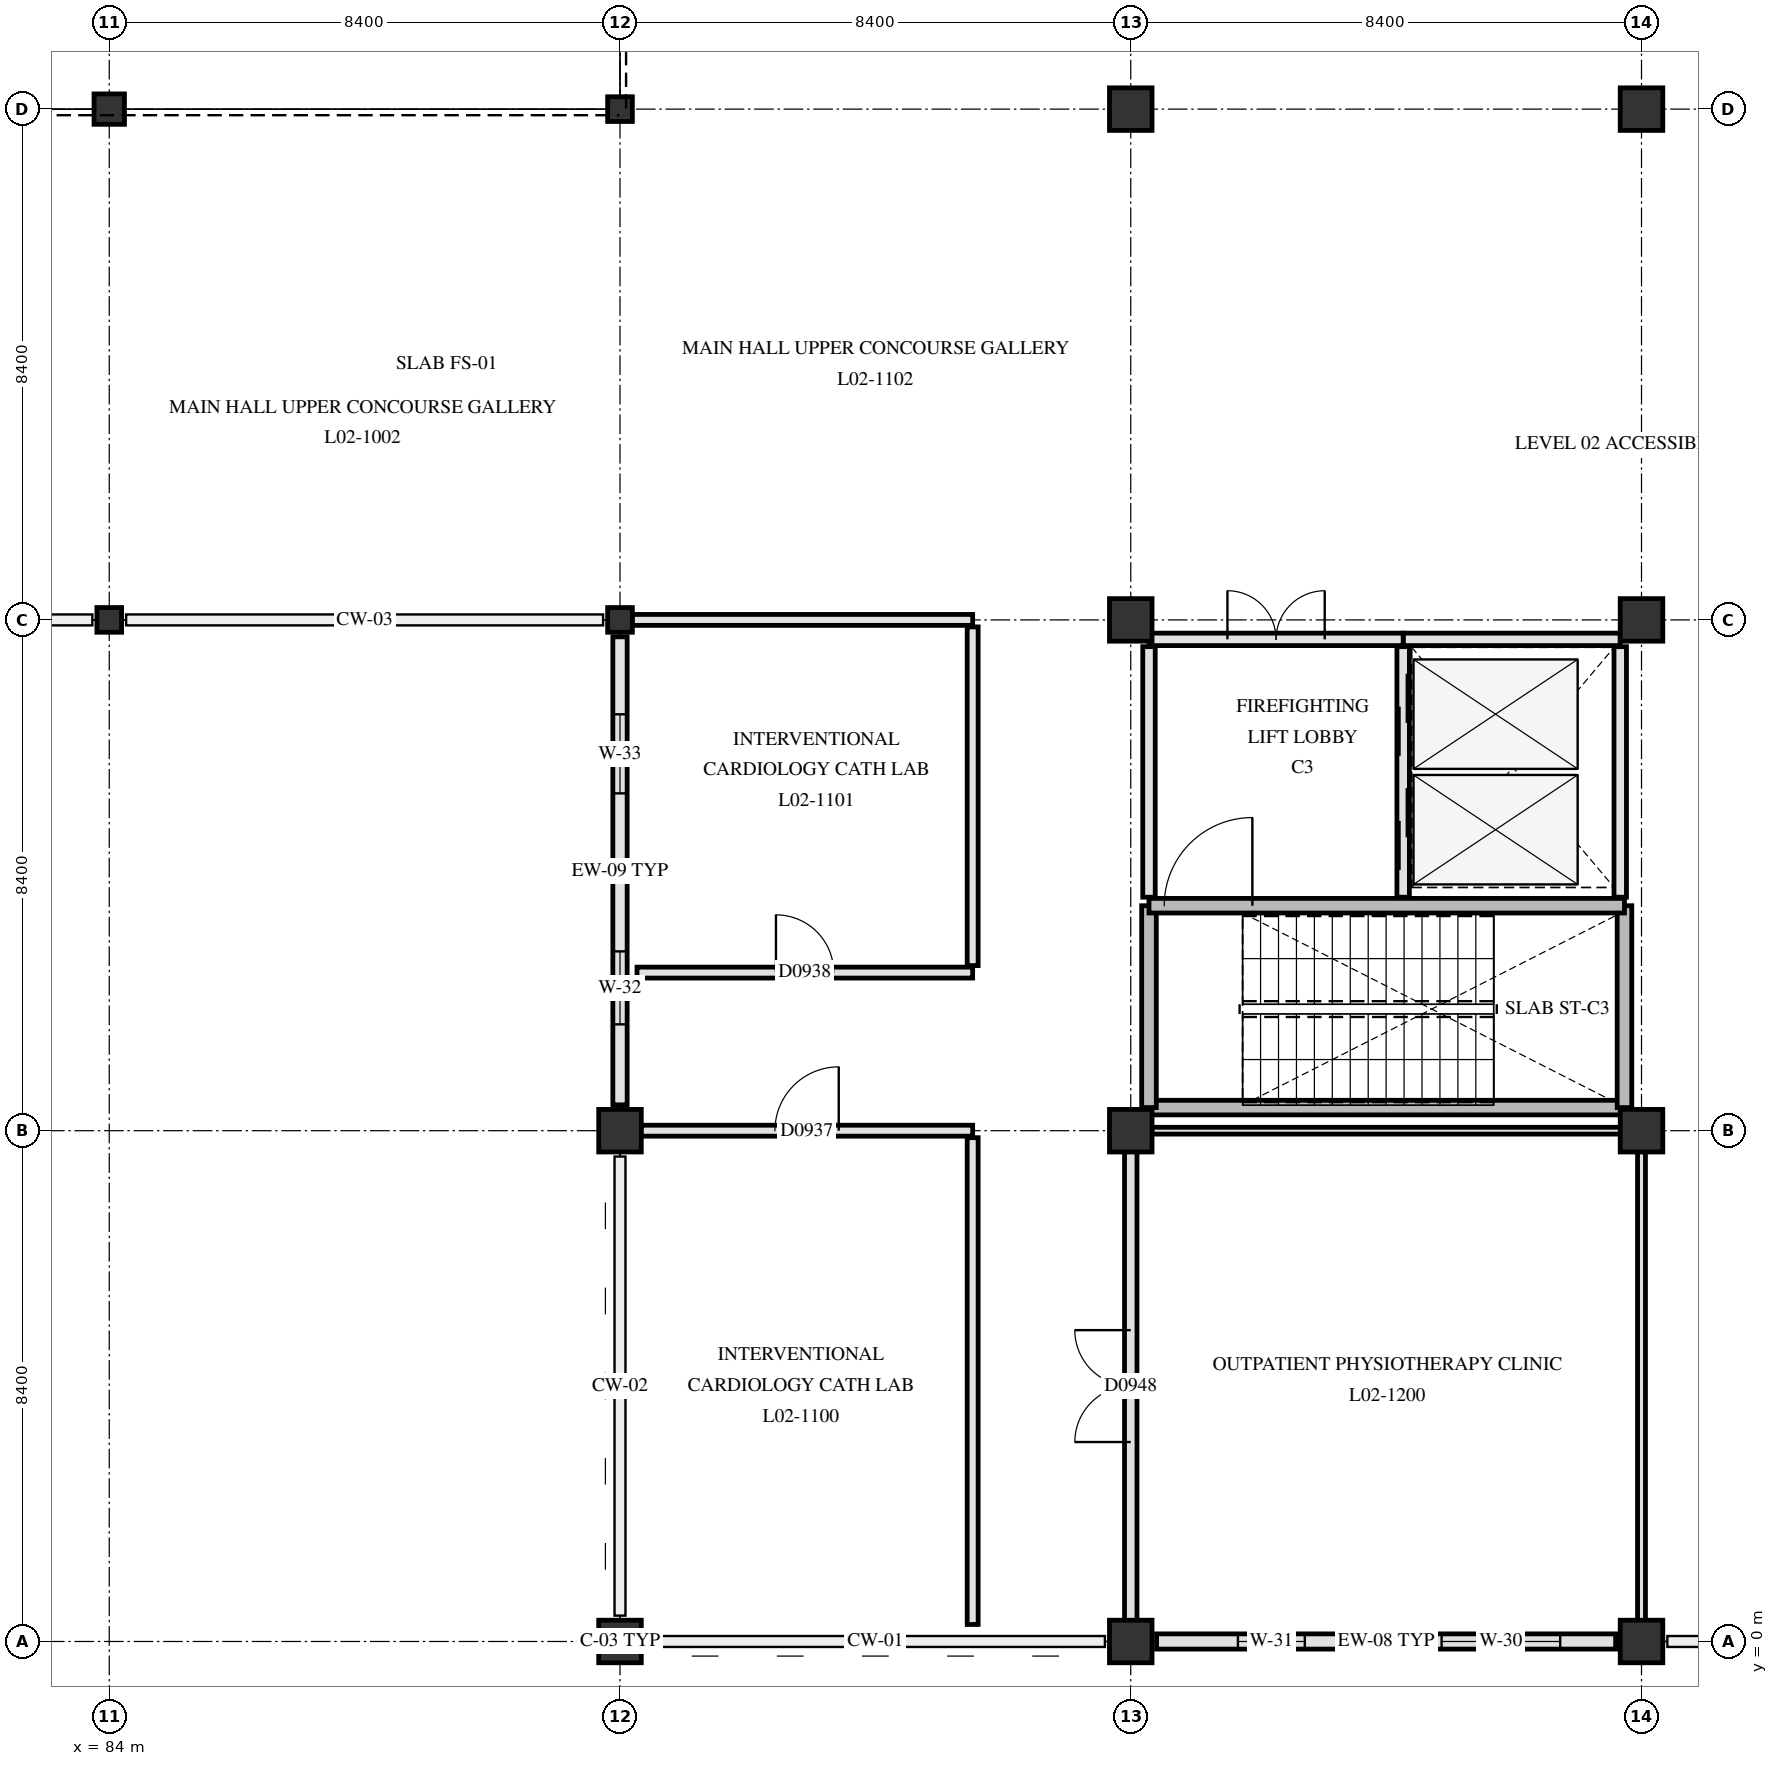
"""IFC4 building model, lengths in metres.
Left out: names, types, materials, properties, quantities, classifications, styles, units other than length and angle.
Written with IfcOpenShell. Run it as: python <this file> out.ifc"""

import sys

from ifc_helpers import new_model, si_unit, direction, frame, frame_2d, origin, origin_2d, place, context, subcontext, project, spatial, rectangle, hollow_circle, extrude, element, fill, save


model = new_model("IFC4")
c1 = context("Model", 3, precision=1e-05, world=origin(), true_north=direction((0.0, 1.0)))
c2 = subcontext(c1, "Body", "Model", "MODEL_VIEW")
j1 = project(units=[si_unit("LENGTHUNIT", "METRE"), si_unit("PLANEANGLEUNIT", "RADIAN")], contexts=[c1])
p1 = place(None, origin())
s1 = spatial("IfcSite", under=j1, at=p1, CompositionType="ELEMENT")
p2 = place(p1, origin())
s2 = spatial("IfcBuilding", under=s1, at=p2, CompositionType="ELEMENT")
p3 = place(p2, frame((0.0, 0.0, 9.3)))
s3 = spatial("IfcBuildingStorey", under=s2, at=p3, CompositionType="ELEMENT", Elevation=9.3)
p4 = place(p3, frame((84.0, 16.8, 0.0), z_axis=(0.0, 0.0, 1.0), x_axis=(1.0, 0.0, 0.0)))
e1 = element("IfcColumn", 1, at=p4, inside=s3, PredefinedType="COLUMN", context=c2, shape_type="SweptSolid", body=[
    extrude(hollow_circle(Radius=0.203, WallThickness=0.016, at=origin_2d()), origin(), (0.0, 0.0, 1.0), 5.1),
])
p5 = place(p3, frame((84.0, 25.2, 0.0), z_axis=(0.0, 0.0, 1.0), x_axis=(1.0, 0.0, 0.0)))
e2 = element("IfcColumn", 2, at=p5, inside=s3, PredefinedType="COLUMN", context=c2, shape_type="SweptSolid", body=[
    extrude(rectangle(XDim=0.5, YDim=0.5, at=origin_2d()), origin(), (0.0, 0.0, 1.0), 5.1),
])
for number, where, z_axis, x_axis in (
    (3, (92.4, 0.0, 0.0), (0.0, 0.0, 1.0), (1.0, 0.0, 0.0)),
    (4, (92.4, 8.4, 0.0), (0.0, 0.0, 1.0), (1.0, 0.0, 0.0)),
):
    element("IfcColumn", number, at=place(p3, frame(where, z_axis=z_axis, x_axis=x_axis)), inside=s3, PredefinedType="COLUMN", context=c2, shape_type="SweptSolid", body=[
        extrude(rectangle(XDim=0.7, YDim=0.7, at=origin_2d()), origin(), (0.0, 0.0, 1.0), 5.1),
    ])
for number, where, z_axis, x_axis in (
    (5, (92.4, 16.8, 0.0), (0.0, 0.0, 1.0), (1.0, 0.0, 0.0)),
    (6, (92.4, 25.2, 0.0), (0.0, 0.0, 1.0), (1.0, 0.0, 0.0)),
):
    element("IfcColumn", number, at=place(p3, frame(where, z_axis=z_axis, x_axis=x_axis)), inside=s3, PredefinedType="COLUMN", context=c2, shape_type="SweptSolid", body=[
        extrude(hollow_circle(Radius=0.203, WallThickness=0.016, at=origin_2d()), origin(), (0.0, 0.0, 1.0), 5.1),
    ])
for number, where, z_axis, x_axis in (
    (7, (100.8, 0.0, 0.0), (0.0, 0.0, 1.0), (1.0, 0.0, 0.0)),
    (8, (100.8, 8.4, 0.0), (0.0, 0.0, 1.0), (1.0, 0.0, 0.0)),
    (9, (100.8, 16.8, 0.0), (0.0, 0.0, 1.0), (1.0, 0.0, 0.0)),
    (10, (100.8, 25.2, 0.0), (0.0, 0.0, 1.0), (1.0, 0.0, 0.0)),
    (11, (109.2, 0.0, 0.0), (0.0, 0.0, 1.0), (1.0, 0.0, 0.0)),
    (12, (109.2, 8.4, 0.0), (0.0, 0.0, 1.0), (1.0, 0.0, 0.0)),
    (13, (109.2, 16.8, 0.0), (0.0, 0.0, 1.0), (1.0, 0.0, 0.0)),
    (14, (109.2, 25.2, 0.0), (0.0, 0.0, 1.0), (1.0, 0.0, 0.0)),
):
    element("IfcColumn", number, at=place(p3, frame(where, z_axis=z_axis, x_axis=x_axis)), inside=s3, PredefinedType="COLUMN", context=c2, shape_type="SweptSolid", body=[
        extrude(rectangle(XDim=0.7, YDim=0.7, at=origin_2d()), origin(), (0.0, 0.0, 1.0), 5.1),
    ])
p6 = place(p3, frame((108.775, 0.0, 0.0), z_axis=(0.0, 0.0, 1.0), x_axis=(-1.0, 0.0, 0.0)))
e15 = element("IfcWall", 15, at=p6, inside=s3, PredefinedType="SOLIDWALL", context=c2, shape_type="SweptSolid", body=[
    extrude(rectangle(XDim=7.55, YDim=0.25, at=frame_2d((3.775, 0.0))), origin(), (0.0, 0.0, 1.0), 4.07),
])
p7 = place(p6, frame((0.913, 0.0, 0.85)))
e16 = element("IfcOpeningElement", 16, at=p7, cuts=e15, PredefinedType="OPENING", context=c2, shape_type="SweptSolid", body=[
    extrude(rectangle(XDim=1.95, YDim=1.54, at=frame_2d((0.975, 0.77))), frame((0.0, 0.135, 0.0), z_axis=(0.0, -1.0, 0.0), x_axis=(1.0, 0.0, 0.0)), (0.0, 0.0, 1.0), 0.27),
])
p8 = place(p6, frame((5.113, 0.0, 0.85)))
e17 = element("IfcOpeningElement", 17, at=p8, cuts=e15, PredefinedType="OPENING", context=c2, shape_type="SweptSolid", body=[
    extrude(rectangle(XDim=1.1, YDim=1.66, at=frame_2d((0.55, 0.83))), frame((0.0, 0.135, 0.0), z_axis=(0.0, -1.0, 0.0), x_axis=(1.0, 0.0, 0.0)), (0.0, 0.0, 1.0), 0.27),
])
p9 = place(p3, frame((92.4, 8.825, 0.0), z_axis=(0.0, 0.0, 1.0), x_axis=(0.0, 1.0, 0.0)))
e18 = element("IfcWall", 18, at=p9, inside=s3, PredefinedType="SOLIDWALL", context=c2, shape_type="SweptSolid", body=[
    extrude(rectangle(XDim=7.697, YDim=0.235, at=frame_2d((3.849, 0.0))), origin(), (0.0, 0.0, 1.0), 4.07),
])
p10 = place(p9, frame((1.324, 0.0, 0.85)))
e19 = element("IfcOpeningElement", 19, at=p10, cuts=e18, PredefinedType="OPENING", context=c2, shape_type="SweptSolid", body=[
    extrude(rectangle(XDim=1.2, YDim=1.66, at=frame_2d((0.6, 0.83))), frame((0.0, 0.127, 0.0), z_axis=(0.0, -1.0, 0.0), x_axis=(1.0, 0.0, 0.0)), (0.0, 0.0, 1.0), 0.255),
])
p11 = place(p9, frame((5.123, 0.0, 0.85)))
e20 = element("IfcOpeningElement", 20, at=p11, cuts=e18, PredefinedType="OPENING", context=c2, shape_type="SweptSolid", body=[
    extrude(rectangle(XDim=1.3, YDim=1.66, at=frame_2d((0.65, 0.83))), frame((0.0, 0.127, 0.0), z_axis=(0.0, -1.0, 0.0), x_axis=(1.0, 0.0, 0.0)), (0.0, 0.0, 1.0), 0.255),
])
p12 = place(p3, frame((101.1, 8.78, 0.0), z_axis=(0.0, 0.0, 1.0), x_axis=(1.0, 0.0, 0.0)))
e21 = element("IfcWall", 21, at=p12, inside=s3, PredefinedType="SHEAR", context=c2, shape_type="SweptSolid", body=[
    extrude(rectangle(XDim=7.82, YDim=0.24, at=frame_2d((3.91, 0.0))), origin(), (0.0, 0.0, 1.0), 4.78),
])
for number, where, z_axis, x_axis in (
    (22, (101.1, 8.78, 0.0), (0.0, 0.0, 1.0), (0.0, 1.0, 0.0)),
    (23, (108.92, 8.78, 0.0), (0.0, 0.0, 1.0), (0.0, 1.0, 0.0)),
):
    element("IfcWall", number, at=place(p3, frame(where, z_axis=z_axis, x_axis=x_axis)), inside=s3, PredefinedType="SHEAR", context=c2, shape_type="SweptSolid", body=[
        extrude(rectangle(XDim=3.32, YDim=0.24, at=frame_2d((1.66, 0.0))), origin(), (0.0, 0.0, 1.0), 4.78),
    ])
p13 = place(p3, frame((101.1, 12.1, 0.0), z_axis=(0.0, 0.0, 1.0), x_axis=(1.0, 0.0, 0.0)))
e24 = element("IfcWall", 24, at=p13, inside=s3, PredefinedType="SHEAR", context=c2, shape_type="SweptSolid", body=[
    extrude(rectangle(XDim=7.82, YDim=0.24, at=frame_2d((3.91, 0.0))), origin(), (0.0, 0.0, 1.0), 4.78),
])
p14 = place(p13, frame((0.25, 0.0, 0.0)))
e25 = element("IfcOpeningElement", 25, at=p14, cuts=e24, PredefinedType="OPENING", context=c2, shape_type="SweptSolid", body=[
    extrude(rectangle(XDim=1.45, YDim=2.2, at=frame_2d((0.725, 1.1))), frame((0.0, 0.13, 0.0), z_axis=(0.0, -1.0, 0.0), x_axis=(1.0, 0.0, 0.0)), (0.0, 0.0, 1.0), 0.26),
])
p15 = place(p3, frame((105.28, 12.24, 0.0), z_axis=(0.0, 0.0, 1.0), x_axis=(0.0, 1.0, 0.0)))
e26 = element("IfcWall", 26, at=p15, inside=s3, PredefinedType="PARTITIONING", context=c2, shape_type="SweptSolid", body=[
    extrude(rectangle(XDim=4.12, YDim=0.205, at=frame_2d((2.06, 0.0))), origin(), (0.0, 0.0, 1.0), 4.77),
])
p16 = place(p15, frame((0.445, 0.0, 0.0)))
e27 = element("IfcOpeningElement", 27, at=p16, cuts=e26, PredefinedType="OPENING", context=c2, shape_type="SweptSolid", body=[
    extrude(rectangle(XDim=1.35, YDim=2.2, at=frame_2d((0.675, 1.1))), frame((0.0, 0.113, 0.0), z_axis=(0.0, -1.0, 0.0), x_axis=(1.0, 0.0, 0.0)), (0.0, 0.0, 1.0), 0.225),
])
p17 = place(p15, frame((2.325, 0.0, 0.0)))
e28 = element("IfcOpeningElement", 28, at=p17, cuts=e26, PredefinedType="OPENING", context=c2, shape_type="SweptSolid", body=[
    extrude(rectangle(XDim=1.35, YDim=2.2, at=frame_2d((0.675, 1.1))), frame((0.0, 0.113, 0.0), z_axis=(0.0, -1.0, 0.0), x_axis=(1.0, 0.0, 0.0)), (0.0, 0.0, 1.0), 0.225),
])
p18 = place(p3, frame((108.85, 12.24, 0.0), z_axis=(0.0, 0.0, 1.0), x_axis=(0.0, 1.0, 0.0)))
e29 = element("IfcWall", 29, at=p18, inside=s3, PredefinedType="PARTITIONING", context=c2, shape_type="SweptSolid", body=[
    extrude(rectangle(XDim=4.12, YDim=0.205, at=frame_2d((2.06, 0.0))), origin(), (0.0, 0.0, 1.0), 4.77),
])
p19 = place(p3, frame((105.28, 16.48, 0.0), z_axis=(0.0, 0.0, 1.0), x_axis=(1.0, 0.0, 0.0)))
e30 = element("IfcWall", 30, at=p19, inside=s3, PredefinedType="PARTITIONING", context=c2, shape_type="SweptSolid", body=[
    extrude(rectangle(XDim=3.57, YDim=0.205, at=frame_2d((1.785, 0.0))), origin(), (0.0, 0.0, 1.0), 4.17),
])
p20 = place(p3, frame((101.1, 12.24, 0.0), z_axis=(0.0, 0.0, 1.0), x_axis=(0.0, 1.0, 0.0)))
e31 = element("IfcWall", 31, at=p20, inside=s3, PredefinedType="PARTITIONING", context=c2, shape_type="SweptSolid", body=[
    extrude(rectangle(XDim=4.12, YDim=0.205, at=frame_2d((2.06, 0.0))), origin(), (0.0, 0.0, 1.0), 4.17),
])
p21 = place(p3, frame((101.1, 16.48, 0.0), z_axis=(0.0, 0.0, 1.0), x_axis=(1.0, 0.0, 0.0)))
e32 = element("IfcWall", 32, at=p21, inside=s3, PredefinedType="PARTITIONING", context=c2, shape_type="SweptSolid", body=[
    extrude(rectangle(XDim=4.18, YDim=0.205, at=frame_2d((2.09, 0.0))), origin(), (0.0, 0.0, 1.0), 4.17),
])
p22 = place(p21, frame((1.29, 0.0, 0.0)))
e33 = element("IfcOpeningElement", 33, at=p22, cuts=e32, PredefinedType="OPENING", context=c2, shape_type="SweptSolid", body=[
    extrude(rectangle(XDim=1.6, YDim=2.25, at=frame_2d((0.8, 1.125))), frame((0.0, 0.113, 0.0), z_axis=(0.0, -1.0, 0.0), x_axis=(1.0, 0.0, 0.0)), (0.0, 0.0, 1.0), 0.225),
])
p23 = place(p3, frame((92.745, 8.4, 0.0), z_axis=(0.0, 0.0, 1.0), x_axis=(1.0, 0.0, 0.0)))
e34 = element("IfcWall", 34, at=p23, inside=s3, PredefinedType="PARTITIONING", context=c2, shape_type="SweptSolid", body=[
    extrude(rectangle(XDim=5.455, YDim=0.18, at=frame_2d((2.728, 0.0))), origin(), (0.0, 0.0, 1.0), 4.17),
])
p24 = place(p23, frame((2.202, 0.0, 0.0)))
e35 = element("IfcOpeningElement", 35, at=p24, cuts=e34, PredefinedType="OPENING", context=c2, shape_type="SweptSolid", body=[
    extrude(rectangle(XDim=1.05, YDim=2.15, at=frame_2d((0.525, 1.075))), frame((0.0, 0.1, 0.0), z_axis=(0.0, -1.0, 0.0), x_axis=(1.0, 0.0, 0.0)), (0.0, 0.0, 1.0), 0.2),
])
p25 = place(p3, frame((101.145, 8.4, 0.0), z_axis=(0.0, 0.0, 1.0), x_axis=(1.0, 0.0, 0.0)))
e36 = element("IfcWall", 36, at=p25, inside=s3, PredefinedType="PARTITIONING", context=c2, shape_type="SweptSolid", body=[
    extrude(rectangle(XDim=7.71, YDim=0.112, at=frame_2d((3.855, 0.0))), origin(), (0.0, 0.0, 1.0), 4.17),
])
p26 = place(p3, frame((92.68, 11.0, 0.0), z_axis=(0.0, 0.0, 1.0), x_axis=(1.0, 0.0, 0.0)))
e37 = element("IfcWall", 37, at=p26, inside=s3, PredefinedType="PARTITIONING", context=c2, shape_type="SweptSolid", body=[
    extrude(rectangle(XDim=5.52, YDim=0.18, at=frame_2d((2.76, 0.0))), origin(), (0.0, 0.0, 1.0), 4.77),
])
p27 = place(p26, frame((2.285, 0.0, 0.0)))
e38 = element("IfcOpeningElement", 38, at=p27, cuts=e37, PredefinedType="OPENING", context=c2, shape_type="SweptSolid", body=[
    extrude(rectangle(XDim=0.95, YDim=2.1, at=frame_2d((0.475, 1.05))), frame((0.0, 0.1, 0.0), z_axis=(0.0, -1.0, 0.0), x_axis=(1.0, 0.0, 0.0)), (0.0, 0.0, 1.0), 0.2),
])
p28 = place(p3, frame((92.598, 16.8, 0.0), z_axis=(0.0, 0.0, 1.0), x_axis=(1.0, 0.0, 0.0)))
e39 = element("IfcWall", 39, at=p28, inside=s3, PredefinedType="PARTITIONING", context=c2, shape_type="SweptSolid", body=[
    extrude(rectangle(XDim=5.602, YDim=0.18, at=frame_2d((2.801, 0.0))), origin(), (0.0, 0.0, 1.0), 4.17),
])
p29 = place(p3, frame((98.2, 0.28, 0.0), z_axis=(0.0, 0.0, 1.0), x_axis=(0.0, 1.0, 0.0)))
e40 = element("IfcWall", 40, at=p29, inside=s3, PredefinedType="PARTITIONING", context=c2, shape_type="SweptSolid", body=[
    extrude(rectangle(XDim=8.005, YDim=0.18, at=frame_2d((4.002, 0.0))), origin(), (0.0, 0.0, 1.0), 4.17),
])
p30 = place(p3, frame((98.2, 11.115, 0.0), z_axis=(0.0, 0.0, 1.0), x_axis=(0.0, 1.0, 0.0)))
e41 = element("IfcWall", 41, at=p30, inside=s3, PredefinedType="PARTITIONING", context=c2, shape_type="SweptSolid", body=[
    extrude(rectangle(XDim=5.57, YDim=0.18, at=frame_2d((2.785, 0.0))), origin(), (0.0, 0.0, 1.0), 4.17),
])
p31 = place(p3, frame((100.8, 0.345, 0.0), z_axis=(0.0, 0.0, 1.0), x_axis=(0.0, 1.0, 0.0)))
e42 = element("IfcWall", 42, at=p31, inside=s3, PredefinedType="PARTITIONING", context=c2, shape_type="SweptSolid", body=[
    extrude(rectangle(XDim=7.71, YDim=0.205, at=frame_2d((3.855, 0.0))), origin(), (0.0, 0.0, 1.0), 4.17),
])
p32 = place(p31, frame((2.935, 0.0, 0.0)))
e43 = element("IfcOpeningElement", 43, at=p32, cuts=e42, PredefinedType="OPENING", context=c2, shape_type="SweptSolid", body=[
    extrude(rectangle(XDim=1.84, YDim=2.28, at=frame_2d((0.92, 1.14))), frame((0.0, 0.113, 0.0), z_axis=(0.0, -1.0, 0.0), x_axis=(1.0, 0.0, 0.0)), (0.0, 0.0, 1.0), 0.225),
])
p33 = place(p3, frame((109.2, 0.345, 0.0), z_axis=(0.0, 0.0, 1.0), x_axis=(0.0, 1.0, 0.0)))
e44 = element("IfcWall", 44, at=p33, inside=s3, PredefinedType="PARTITIONING", context=c2, shape_type="SweptSolid", body=[
    extrude(rectangle(XDim=7.71, YDim=0.13, at=frame_2d((3.855, 0.0))), origin(), (0.0, 0.0, 1.0), 4.17),
])
p34 = place(p7, origin())
e45 = element("IfcWindow", 45, at=p34, inside=s3, PartitioningType="SINGLE_PANEL", PredefinedType="WINDOW", context=c2, shape_type="SweptSolid", body=[
    extrude(rectangle(XDim=1.95, YDim=1.54, at=frame_2d((0.975, 0.77))), frame((0.0, 0.03, 0.0), z_axis=(0.0, -1.0, 0.0), x_axis=(1.0, 0.0, 0.0)), (0.0, 0.0, 1.0), 0.06),
])
fill(e16, e45)
p35 = place(p8, origin())
e46 = element("IfcWindow", 46, at=p35, inside=s3, PartitioningType="SINGLE_PANEL", PredefinedType="WINDOW", context=c2, shape_type="SweptSolid", body=[
    extrude(rectangle(XDim=1.1, YDim=1.66, at=frame_2d((0.55, 0.83))), frame((0.0, 0.03, 0.0), z_axis=(0.0, -1.0, 0.0), x_axis=(1.0, 0.0, 0.0)), (0.0, 0.0, 1.0), 0.06),
])
fill(e17, e46)
p36 = place(p10, origin())
e47 = element("IfcWindow", 47, at=p36, inside=s3, PartitioningType="SINGLE_PANEL", PredefinedType="WINDOW", context=c2, shape_type="SweptSolid", body=[
    extrude(rectangle(XDim=1.2, YDim=1.66, at=frame_2d((0.6, 0.83))), frame((0.0, 0.03, 0.0), z_axis=(0.0, -1.0, 0.0), x_axis=(1.0, 0.0, 0.0)), (0.0, 0.0, 1.0), 0.06),
])
fill(e19, e47)
p37 = place(p11, origin())
e48 = element("IfcWindow", 48, at=p37, inside=s3, PartitioningType="SINGLE_PANEL", PredefinedType="WINDOW", context=c2, shape_type="SweptSolid", body=[
    extrude(rectangle(XDim=1.3, YDim=1.66, at=frame_2d((0.65, 0.83))), frame((0.0, 0.03, 0.0), z_axis=(0.0, -1.0, 0.0), x_axis=(1.0, 0.0, 0.0)), (0.0, 0.0, 1.0), 0.06),
])
fill(e20, e48)
p38 = place(p14, origin())
e49 = element("IfcDoor", 49, at=p38, inside=s3, OperationType="SINGLE_SWING_RIGHT", PredefinedType="DOOR", context=c2, shape_type="SweptSolid", body=[
    extrude(rectangle(XDim=1.45, YDim=2.2, at=frame_2d((0.725, 1.1))), frame((0.0, 0.025, 0.0), z_axis=(0.0, -1.0, 0.0), x_axis=(1.0, 0.0, 0.0)), (0.0, 0.0, 1.0), 0.05),
])
fill(e25, e49)
p39 = place(p16, origin())
e50 = element("IfcDoor", 50, at=p39, inside=s3, OperationType="SLIDING_TO_LEFT", PredefinedType="DOOR", context=c2, shape_type="SweptSolid", body=[
    extrude(rectangle(XDim=1.35, YDim=2.2, at=frame_2d((0.675, 1.1))), frame((0.0, 0.025, 0.0), z_axis=(0.0, -1.0, 0.0), x_axis=(1.0, 0.0, 0.0)), (0.0, 0.0, 1.0), 0.05),
])
fill(e27, e50)
p40 = place(p17, origin())
e51 = element("IfcDoor", 51, at=p40, inside=s3, OperationType="SLIDING_TO_LEFT", PredefinedType="DOOR", context=c2, shape_type="SweptSolid", body=[
    extrude(rectangle(XDim=1.35, YDim=2.2, at=frame_2d((0.675, 1.1))), frame((0.0, 0.025, 0.0), z_axis=(0.0, -1.0, 0.0), x_axis=(1.0, 0.0, 0.0)), (0.0, 0.0, 1.0), 0.05),
])
fill(e28, e51)
p41 = place(p22, origin())
e52 = element("IfcDoor", 52, at=p41, inside=s3, OperationType="DOUBLE_SWING_LEFT", PredefinedType="DOOR", context=c2, shape_type="SweptSolid", body=[
    extrude(rectangle(XDim=1.6, YDim=2.25, at=frame_2d((0.8, 1.125))), frame((0.0, 0.025, 0.0), z_axis=(0.0, -1.0, 0.0), x_axis=(1.0, 0.0, 0.0)), (0.0, 0.0, 1.0), 0.05),
])
fill(e33, e52)
p42 = place(p24, origin())
e53 = element("IfcDoor", 53, at=p42, inside=s3, OperationType="SINGLE_SWING_RIGHT", PredefinedType="DOOR", context=c2, shape_type="SweptSolid", body=[
    extrude(rectangle(XDim=1.05, YDim=2.15, at=frame_2d((0.525, 1.075))), frame((0.0, 0.025, 0.0), z_axis=(0.0, -1.0, 0.0), x_axis=(1.0, 0.0, 0.0)), (0.0, 0.0, 1.0), 0.05),
])
fill(e35, e53)
p43 = place(p27, origin())
e54 = element("IfcDoor", 54, at=p43, inside=s3, OperationType="SINGLE_SWING_LEFT", PredefinedType="DOOR", context=c2, shape_type="SweptSolid", body=[
    extrude(rectangle(XDim=0.95, YDim=2.1, at=frame_2d((0.475, 1.05))), frame((0.0, 0.025, 0.0), z_axis=(0.0, -1.0, 0.0), x_axis=(1.0, 0.0, 0.0)), (0.0, 0.0, 1.0), 0.05),
])
fill(e38, e54)
p44 = place(p32, origin())
e55 = element("IfcDoor", 55, at=p44, inside=s3, OperationType="DOUBLE_SWING_LEFT", PredefinedType="DOOR", context=c2, shape_type="SweptSolid", body=[
    extrude(rectangle(XDim=1.84, YDim=2.28, at=frame_2d((0.92, 1.14))), frame((0.0, 0.025, 0.0), z_axis=(0.0, -1.0, 0.0), x_axis=(1.0, 0.0, 0.0)), (0.0, 0.0, 1.0), 0.05),
])
fill(e43, e55)
save(model, sys.argv[1])
